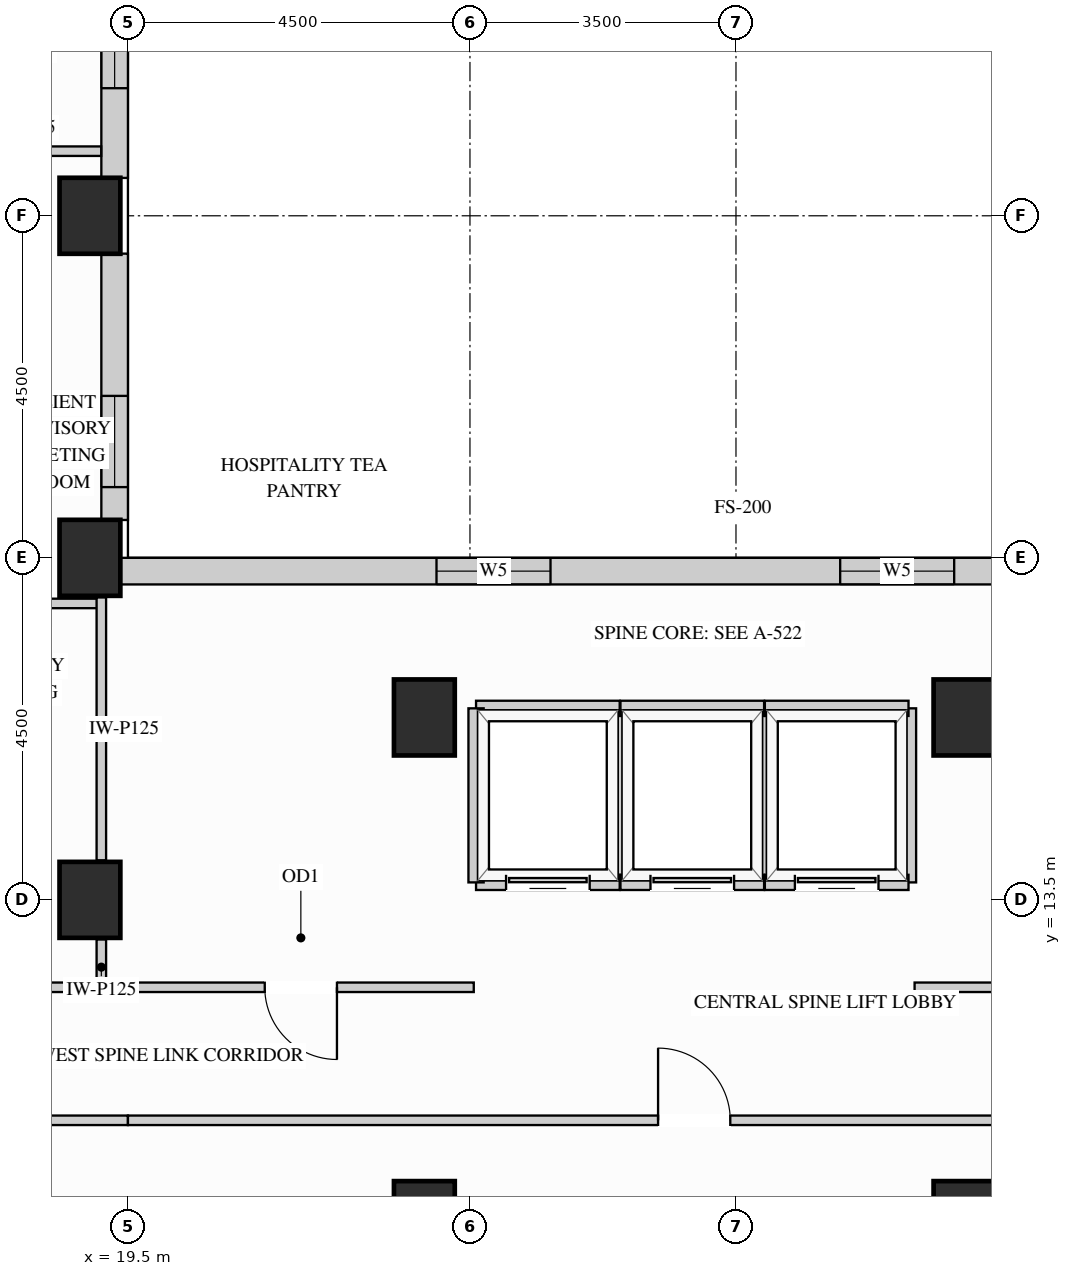
"""IFC4 building model, lengths in metres.
Left out: names, types, materials, properties, quantities, classifications, styles, units other than length and angle.
Written with IfcOpenShell. Run it as: python <this file> out.ifc"""

import sys

from ifc_helpers import new_model, si_unit, direction, frame, frame_2d, origin, origin_2d, place, context, subcontext, project, spatial, rectangle, extrude, source, transform, mapped, element, fill, save


model = new_model("IFC4")
c1 = context("Model", 3, precision=1e-05, world=origin(), true_north=direction((0.0, 1.0)))
c2 = subcontext(c1, "Body", "Model", "MODEL_VIEW")
j1 = project(units=[si_unit("LENGTHUNIT", "METRE"), si_unit("PLANEANGLEUNIT", "RADIAN")], contexts=[c1])
p1 = place(None, origin())
s1 = spatial("IfcSite", under=j1, at=p1, CompositionType="ELEMENT")
p2 = place(p1, origin())
s2 = spatial("IfcBuilding", under=s1, at=p2, CompositionType="ELEMENT")
p3 = place(p2, frame((0.0, 0.0, 164.7)))
s3 = spatial("IfcBuildingStorey", under=s2, at=p3, CompositionType="ELEMENT", Elevation=164.7)
m1 = source(origin(), c2, "Body", "SweptSolid", [
    extrude(rectangle(XDim=0.8, YDim=1.0, at=origin_2d()), origin(), (0.0, 0.0, 1.0), 3.4),
])
for number, where, z_axis, x_axis in (
    (1, (19.0, 13.5, 0.0), (0.0, 0.0, 1.0), (1.0, 0.0, 0.0)),
    (2, (19.0, 18.0, 0.0), (0.0, 0.0, 1.0), (1.0, 0.0, 0.0)),
    (3, (19.0, 22.5, 0.0), (0.0, 0.0, 1.0), (1.0, 0.0, 0.0)),
    (4, (23.4, 15.9, 0.0), (0.0, 0.0, 1.0), (1.0, 0.0, 0.0)),
    (5, (23.4, 9.3, 0.0), (0.0, 0.0, 1.0), (1.0, 0.0, 0.0)),
    (6, (30.5, 15.9, 0.0), (0.0, 0.0, 1.0), (1.0, 0.0, 0.0)),
    (7, (30.5, 9.3, 0.0), (0.0, 0.0, 1.0), (1.0, 0.0, 0.0)),
):
    element("IfcColumn", number, at=place(p3, frame(where, z_axis=z_axis, x_axis=x_axis)), inside=s3, PredefinedType="COLUMN", context=c2, shape_type="MappedRepresentation", body=[
        mapped(m1, transform((0.0, 0.0, 0.0), x_axis=(1.0, 0.0, 0.0), y_axis=(0.0, 1.0, 0.0), z_axis=(0.0, 0.0, 1.0))),
    ])
p4 = place(p3, frame((34.502, 17.825, 0.0), z_axis=(0.0, 0.0, 1.0), x_axis=(-1.0, 0.0, 0.0)))
e8 = element("IfcWall", 8, at=p4, inside=s3, PredefinedType="SOLIDWALL", context=c2, shape_type="SweptSolid", body=[
    extrude(rectangle(XDim=15.104, YDim=0.35, at=frame_2d((7.552, 0.0))), origin(), (0.0, 0.0, 1.0), 3.385),
])
p5 = place(p4, frame((4.131, 0.0, 0.78)))
e9 = element("IfcOpeningElement", 9, at=p5, cuts=e8, PredefinedType="OPENING", context=c2, shape_type="SweptSolid", body=[
    extrude(rectangle(XDim=1.5, YDim=2.0, at=frame_2d((0.75, 1.0))), frame((0.0, 0.185, 0.0), z_axis=(0.0, -1.0, 0.0), x_axis=(1.0, 0.0, 0.0)), (0.0, 0.0, 1.0), 0.37),
])
p6 = place(p4, frame((9.442, 0.0, 0.78)))
e10 = element("IfcOpeningElement", 10, at=p6, cuts=e8, PredefinedType="OPENING", context=c2, shape_type="SweptSolid", body=[
    extrude(rectangle(XDim=1.5, YDim=2.0, at=frame_2d((0.75, 1.0))), frame((0.0, 0.185, 0.0), z_axis=(0.0, -1.0, 0.0), x_axis=(1.0, 0.0, 0.0)), (0.0, 0.0, 1.0), 0.37),
])
p7 = place(p3, frame((19.325, 18.498, 0.0), z_axis=(0.0, 0.0, 1.0), x_axis=(0.0, 1.0, 0.0)))
e11 = element("IfcWall", 11, at=p7, inside=s3, PredefinedType="SOLIDWALL", context=c2, shape_type="SweptSolid", body=[
    extrude(rectangle(XDim=3.504, YDim=0.35, at=frame_2d((1.752, 0.0))), origin(), (0.0, 0.0, 1.0), 2.612),
])
p8 = place(p7, frame((0.433, 0.0, 0.78)))
e12 = element("IfcOpeningElement", 12, at=p8, cuts=e11, PredefinedType="OPENING", context=c2, shape_type="SweptSolid", body=[
    extrude(rectangle(XDim=1.2, YDim=1.652, at=frame_2d((0.6, 0.826))), frame((0.0, 0.185, 0.0), z_axis=(0.0, -1.0, 0.0), x_axis=(1.0, 0.0, 0.0)), (0.0, 0.0, 1.0), 0.37),
])
p9 = place(p3, frame((19.325, 22.998, 0.0), z_axis=(0.0, 0.0, 1.0), x_axis=(0.0, 1.0, 0.0)))
e13 = element("IfcWall", 13, at=p9, inside=s3, PredefinedType="SOLIDWALL", context=c2, shape_type="SweptSolid", body=[
    extrude(rectangle(XDim=3.304, YDim=0.35, at=frame_2d((1.652, 0.0))), origin(), (0.0, 0.0, 1.0), 2.612),
])
p10 = place(p9, frame((1.18, 0.0, 0.78)))
e14 = element("IfcOpeningElement", 14, at=p10, cuts=e13, PredefinedType="OPENING", context=c2, shape_type="SweptSolid", body=[
    extrude(rectangle(XDim=1.5, YDim=1.652, at=frame_2d((0.75, 0.826))), frame((0.0, 0.185, 0.0), z_axis=(0.0, -1.0, 0.0), x_axis=(1.0, 0.0, 0.0)), (0.0, 0.0, 1.0), 0.37),
])
m2 = source(origin(), c2, "Body", "SweptSolid", [
    extrude(rectangle(XDim=2.1, YDim=0.125, at=frame_2d((1.05, 0.0))), origin(), (0.0, 0.0, 1.0), 3.385),
])
p11 = place(p3, frame((17.05, 17.4, 0.0), z_axis=(0.0, 0.0, 1.0), x_axis=(1.0, 0.0, 0.0)))
e15 = element("IfcWall", 15, at=p11, inside=s3, PredefinedType="PARTITIONING", context=c2, shape_type="MappedRepresentation", body=[
    mapped(m2, transform((0.0, 0.0, 0.0), x_axis=(1.0, 0.0, 0.0), y_axis=(0.0, 1.0, 0.0), z_axis=(0.0, 0.0, 1.0))),
])
m3 = source(origin(), c2, "Body", "SweptSolid", [
    extrude(rectangle(XDim=2.098, YDim=0.125, at=frame_2d((1.049, 0.0))), origin(), (0.0, 0.0, 1.0), 3.385),
])
p12 = place(p3, frame((17.05, 23.35, 0.0), z_axis=(0.0, 0.0, 1.0), x_axis=(1.0, 0.0, 0.0)))
e16 = element("IfcWall", 16, at=p12, inside=s3, PredefinedType="PARTITIONING", context=c2, shape_type="MappedRepresentation", body=[
    mapped(m3, transform((0.0, 0.0, 0.0), x_axis=(1.0, 0.0, 0.0), y_axis=(0.0, 1.0, 0.0), z_axis=(0.0, 0.0, 1.0))),
])
m4 = source(origin(), c2, "Body", "SweptSolid", [
    extrude(rectangle(XDim=0.63, YDim=0.125, at=frame_2d((0.315, 0.0))), origin(), (0.0, 0.0, 1.0), 2.773),
])
p13 = place(p3, frame((19.15, 12.35, 0.0), z_axis=(0.0, 0.0, 1.0), x_axis=(0.0, 1.0, 0.0)))
e17 = element("IfcWall", 17, at=p13, inside=s3, PredefinedType="PARTITIONING", context=c2, shape_type="MappedRepresentation", body=[
    mapped(m4, transform((0.0, 0.0, 0.0), x_axis=(1.0, 0.0, 0.0), y_axis=(0.0, 1.0, 0.0), z_axis=(0.0, 0.0, 1.0))),
])
m5 = source(origin(), c2, "Body", "SweptSolid", [
    extrude(rectangle(XDim=3.46, YDim=0.125, at=frame_2d((1.73, 0.0))), origin(), (0.0, 0.0, 1.0), 2.773),
])
p14 = place(p3, frame((19.15, 14.02, 0.0), z_axis=(0.0, 0.0, 1.0), x_axis=(0.0, 1.0, 0.0)))
e18 = element("IfcWall", 18, at=p14, inside=s3, PredefinedType="PARTITIONING", context=c2, shape_type="MappedRepresentation", body=[
    mapped(m5, transform((0.0, 0.0, 0.0), x_axis=(1.0, 0.0, 0.0), y_axis=(0.0, 1.0, 0.0), z_axis=(0.0, 0.0, 1.0))),
])
p15 = place(p3, frame((29.85, 12.35, 0.0), z_axis=(0.0, 0.0, 1.0), x_axis=(1.0, 0.0, 0.0)))
e19 = element("IfcWall", 19, at=p15, inside=s3, PredefinedType="PARTITIONING", context=c2, shape_type="SweptSolid", body=[
    extrude(rectangle(XDim=4.55, YDim=0.125, at=frame_2d((2.275, 0.0))), origin(), (0.0, 0.0, 1.0), 3.385),
])
p16 = place(p15, frame((1.8, 0.0, 0.0)))
e20 = element("IfcOpeningElement", 20, at=p16, cuts=e19, PredefinedType="OPENING", context=c2, shape_type="SweptSolid", body=[
    extrude(rectangle(XDim=0.95, YDim=2.15, at=frame_2d((0.475, 1.075))), frame((0.0, 0.073, 0.0), z_axis=(0.0, -1.0, 0.0), x_axis=(1.0, 0.0, 0.0)), (0.0, 0.0, 1.0), 0.145),
])
m6 = source(origin(), c2, "Body", "SweptSolid", [
    extrude(rectangle(XDim=2.45, YDim=0.125, at=frame_2d((1.225, 0.0))), origin(), (0.0, 0.0, 1.0), 3.385),
])
p17 = place(p3, frame((17.05, 12.35, 0.0), z_axis=(0.0, 0.0, 1.0), x_axis=(1.0, 0.0, 0.0)))
e21 = element("IfcWall", 21, at=p17, inside=s3, PredefinedType="PARTITIONING", context=c2, shape_type="MappedRepresentation", body=[
    mapped(m6, transform((0.0, 0.0, 0.0), x_axis=(1.0, 0.0, 0.0), y_axis=(0.0, 1.0, 0.0), z_axis=(0.0, 0.0, 1.0))),
])
p18 = place(p3, frame((19.5, 12.35, 0.0), z_axis=(0.0, 0.0, 1.0), x_axis=(1.0, 0.0, 0.0)))
e22 = element("IfcWall", 22, at=p18, inside=s3, PredefinedType="PARTITIONING", context=c2, shape_type="SweptSolid", body=[
    extrude(rectangle(XDim=4.55, YDim=0.125, at=frame_2d((2.275, 0.0))), origin(), (0.0, 0.0, 1.0), 3.385),
])
p19 = place(p18, frame((1.8, 0.0, 0.0)))
e23 = element("IfcOpeningElement", 23, at=p19, cuts=e22, PredefinedType="OPENING", context=c2, shape_type="SweptSolid", body=[
    extrude(rectangle(XDim=0.95, YDim=2.15, at=frame_2d((0.475, 1.075))), frame((0.0, 0.073, 0.0), z_axis=(0.0, -1.0, 0.0), x_axis=(1.0, 0.0, 0.0)), (0.0, 0.0, 1.0), 0.145),
])
p20 = place(p3, frame((17.05, 10.6, 0.0), z_axis=(0.0, 0.0, 1.0), x_axis=(1.0, 0.0, 0.0)))
e24 = element("IfcWall", 24, at=p20, inside=s3, PredefinedType="PARTITIONING", context=c2, shape_type="MappedRepresentation", body=[
    mapped(m6, transform((0.0, 0.0, 0.0), x_axis=(1.0, 0.0, 0.0), y_axis=(0.0, 1.0, 0.0), z_axis=(0.0, 0.0, 1.0))),
])
p21 = place(p3, frame((19.5, 10.6, 0.0), z_axis=(0.0, 0.0, 1.0), x_axis=(1.0, 0.0, 0.0)))
e25 = element("IfcWall", 25, at=p21, inside=s3, PredefinedType="PARTITIONING", context=c2, shape_type="SweptSolid", body=[
    extrude(rectangle(XDim=14.9, YDim=0.125, at=frame_2d((7.45, 0.0))), origin(), (0.0, 0.0, 1.0), 3.385),
])
p22 = place(p21, frame((6.975, 0.0, 0.0)))
e26 = element("IfcOpeningElement", 26, at=p22, cuts=e25, PredefinedType="OPENING", context=c2, shape_type="SweptSolid", body=[
    extrude(rectangle(XDim=0.95, YDim=2.15, at=frame_2d((0.475, 1.075))), frame((0.0, 0.073, 0.0), z_axis=(0.0, -1.0, 0.0), x_axis=(1.0, 0.0, 0.0)), (0.0, 0.0, 1.0), 0.145),
])
m7 = source(origin(), c2, "Body", "SweptSolid", [
    extrude(rectangle(XDim=2.29, YDim=0.2, at=frame_2d((1.145, 0.0))), origin(), (0.0, 0.0, 1.0), 3.385),
])
p23 = place(p3, frame((25.97, 13.73, 0.0), z_axis=(0.0, 0.0, 1.0), x_axis=(0.0, 1.0, 0.0)))
e27 = element("IfcWall", 27, at=p23, inside=s3, PredefinedType="PARTITIONING", context=c2, shape_type="MappedRepresentation", body=[
    mapped(m7, transform((0.0, 0.0, 0.0), x_axis=(1.0, 0.0, 0.0), y_axis=(0.0, 1.0, 0.0), z_axis=(0.0, 0.0, 1.0))),
])
m8 = source(origin(), c2, "Body", "SweptSolid", [
    extrude(rectangle(XDim=1.89, YDim=0.2, at=frame_2d((0.945, 0.0))), origin(), (0.0, 0.0, 1.0), 2.773),
])
p24 = place(p3, frame((24.08, 16.02, 0.0), z_axis=(0.0, 0.0, 1.0), x_axis=(1.0, 0.0, 0.0)))
e28 = element("IfcWall", 28, at=p24, inside=s3, PredefinedType="PARTITIONING", context=c2, shape_type="MappedRepresentation", body=[
    mapped(m8, transform((0.0, 0.0, 0.0), x_axis=(1.0, 0.0, 0.0), y_axis=(0.0, 1.0, 0.0), z_axis=(0.0, 0.0, 1.0))),
])
p25 = place(p3, frame((24.08, 13.73, 0.0), z_axis=(0.0, 0.0, 1.0), x_axis=(1.0, 0.0, 0.0)))
e29 = element("IfcWall", 29, at=p25, inside=s3, PredefinedType="PARTITIONING", context=c2, shape_type="SweptSolid", body=[
    extrude(rectangle(XDim=1.89, YDim=0.2, at=frame_2d((0.945, 0.0))), origin(), (0.0, 0.0, 1.0), 2.466),
])
p26 = place(p25, frame((0.395, 0.0, 0.0)))
e30 = element("IfcOpeningElement", 30, at=p26, cuts=e29, PredefinedType="OPENING", context=c2, shape_type="SweptSolid", body=[
    extrude(rectangle(XDim=1.1, YDim=2.2, at=frame_2d((0.55, 1.1))), frame((0.0, 0.11, 0.0), z_axis=(0.0, -1.0, 0.0), x_axis=(1.0, 0.0, 0.0)), (0.0, 0.0, 1.0), 0.22),
])
for number, where, z_axis, x_axis in (
    (31, (24.08, 13.73, 0.0), (0.0, 0.0, 1.0), (0.0, 1.0, 0.0)),
    (32, (27.87, 13.73, 0.0), (0.0, 0.0, 1.0), (0.0, 1.0, 0.0)),
):
    element("IfcWall", number, at=place(p3, frame(where, z_axis=z_axis, x_axis=x_axis)), inside=s3, PredefinedType="PARTITIONING", context=c2, shape_type="MappedRepresentation", body=[
        mapped(m7, transform((0.0, 0.0, 0.0), x_axis=(1.0, 0.0, 0.0), y_axis=(0.0, 1.0, 0.0), z_axis=(0.0, 0.0, 1.0))),
    ])
m9 = source(origin(), c2, "Body", "SweptSolid", [
    extrude(rectangle(XDim=1.89, YDim=0.2, at=frame_2d((0.945, 0.0))), origin(), (0.0, 0.0, 1.0), 2.773),
])
p27 = place(p3, frame((25.98, 16.02, 0.0), z_axis=(0.0, 0.0, 1.0), x_axis=(1.0, 0.0, 0.0)))
e33 = element("IfcWall", 33, at=p27, inside=s3, PredefinedType="PARTITIONING", context=c2, shape_type="MappedRepresentation", body=[
    mapped(m9, transform((0.0, 0.0, 0.0), x_axis=(1.0, 0.0, 0.0), y_axis=(0.0, 1.0, 0.0), z_axis=(0.0, 0.0, 1.0))),
])
p28 = place(p3, frame((25.98, 13.73, 0.0), z_axis=(0.0, 0.0, 1.0), x_axis=(1.0, 0.0, 0.0)))
e34 = element("IfcWall", 34, at=p28, inside=s3, PredefinedType="PARTITIONING", context=c2, shape_type="SweptSolid", body=[
    extrude(rectangle(XDim=1.89, YDim=0.2, at=frame_2d((0.945, 0.0))), origin(), (0.0, 0.0, 1.0), 2.466),
])
p29 = place(p28, frame((0.395, 0.0, 0.0)))
e35 = element("IfcOpeningElement", 35, at=p29, cuts=e34, PredefinedType="OPENING", context=c2, shape_type="SweptSolid", body=[
    extrude(rectangle(XDim=1.1, YDim=2.2, at=frame_2d((0.55, 1.1))), frame((0.0, 0.11, 0.0), z_axis=(0.0, -1.0, 0.0), x_axis=(1.0, 0.0, 0.0)), (0.0, 0.0, 1.0), 0.22),
])
p30 = place(p3, frame((29.77, 13.73, 0.0), z_axis=(0.0, 0.0, 1.0), x_axis=(0.0, 1.0, 0.0)))
e36 = element("IfcWall", 36, at=p30, inside=s3, PredefinedType="PARTITIONING", context=c2, shape_type="MappedRepresentation", body=[
    mapped(m7, transform((0.0, 0.0, 0.0), x_axis=(1.0, 0.0, 0.0), y_axis=(0.0, 1.0, 0.0), z_axis=(0.0, 0.0, 1.0))),
])
p31 = place(p3, frame((27.88, 16.02, 0.0), z_axis=(0.0, 0.0, 1.0), x_axis=(1.0, 0.0, 0.0)))
e37 = element("IfcWall", 37, at=p31, inside=s3, PredefinedType="PARTITIONING", context=c2, shape_type="MappedRepresentation", body=[
    mapped(m9, transform((0.0, 0.0, 0.0), x_axis=(1.0, 0.0, 0.0), y_axis=(0.0, 1.0, 0.0), z_axis=(0.0, 0.0, 1.0))),
])
p32 = place(p3, frame((27.88, 13.73, 0.0), z_axis=(0.0, 0.0, 1.0), x_axis=(1.0, 0.0, 0.0)))
e38 = element("IfcWall", 38, at=p32, inside=s3, PredefinedType="PARTITIONING", context=c2, shape_type="SweptSolid", body=[
    extrude(rectangle(XDim=1.89, YDim=0.2, at=frame_2d((0.945, 0.0))), origin(), (0.0, 0.0, 1.0), 2.466),
])
p33 = place(p32, frame((0.395, 0.0, 0.0)))
e39 = element("IfcOpeningElement", 39, at=p33, cuts=e38, PredefinedType="OPENING", context=c2, shape_type="SweptSolid", body=[
    extrude(rectangle(XDim=1.1, YDim=2.2, at=frame_2d((0.55, 1.1))), frame((0.0, 0.11, 0.0), z_axis=(0.0, -1.0, 0.0), x_axis=(1.0, 0.0, 0.0)), (0.0, 0.0, 1.0), 0.22),
])
m10 = source(origin(), c2, "Body", "SweptSolid", [
    extrude(rectangle(XDim=1.1, YDim=2.2, at=frame_2d((0.55, 1.1))), frame((0.0, 0.025, 0.0), z_axis=(0.0, -1.0, 0.0), x_axis=(1.0, 0.0, 0.0)), (0.0, 0.0, 1.0), 0.05),
])
p34 = place(p26, origin())
e40 = element("IfcDoor", 40, at=p34, inside=s3, OperationType="SLIDING_TO_LEFT", PredefinedType="DOOR", context=c2, shape_type="MappedRepresentation", body=[
    mapped(m10, transform((0.0, 0.0, 0.0), x_axis=(1.0, 0.0, 0.0), y_axis=(0.0, 1.0, 0.0), z_axis=(0.0, 0.0, 1.0))),
])
fill(e30, e40)
p35 = place(p29, origin())
e41 = element("IfcDoor", 41, at=p35, inside=s3, OperationType="SLIDING_TO_LEFT", PredefinedType="DOOR", context=c2, shape_type="MappedRepresentation", body=[
    mapped(m10, transform((0.0, 0.0, 0.0), x_axis=(1.0, 0.0, 0.0), y_axis=(0.0, 1.0, 0.0), z_axis=(0.0, 0.0, 1.0))),
])
fill(e35, e41)
p36 = place(p33, origin())
e42 = element("IfcDoor", 42, at=p36, inside=s3, OperationType="SLIDING_TO_LEFT", PredefinedType="DOOR", context=c2, shape_type="MappedRepresentation", body=[
    mapped(m10, transform((0.0, 0.0, 0.0), x_axis=(1.0, 0.0, 0.0), y_axis=(0.0, 1.0, 0.0), z_axis=(0.0, 0.0, 1.0))),
])
fill(e39, e42)
m11 = source(origin(), c2, "Body", "SweptSolid", [
    extrude(rectangle(XDim=0.95, YDim=2.15, at=frame_2d((0.475, 1.075))), frame((0.0, 0.025, 0.0), z_axis=(0.0, -1.0, 0.0), x_axis=(1.0, 0.0, 0.0)), (0.0, 0.0, 1.0), 0.05),
])
p37 = place(p19, origin())
e43 = element("IfcDoor", 43, at=p37, inside=s3, OperationType="SINGLE_SWING_RIGHT", PredefinedType="DOOR", context=c2, shape_type="MappedRepresentation", body=[
    mapped(m11, transform((0.0, 0.0, 0.0), x_axis=(1.0, 0.0, 0.0), y_axis=(0.0, 1.0, 0.0), z_axis=(0.0, 0.0, 1.0))),
])
fill(e23, e43)
p38 = place(p22, origin())
e44 = element("IfcDoor", 44, at=p38, inside=s3, OperationType="SINGLE_SWING_LEFT", PredefinedType="DOOR", context=c2, shape_type="MappedRepresentation", body=[
    mapped(m11, transform((0.0, 0.0, 0.0), x_axis=(1.0, 0.0, 0.0), y_axis=(0.0, 1.0, 0.0), z_axis=(0.0, 0.0, 1.0))),
])
fill(e26, e44)
m12 = source(origin(), c2, "Body", "SweptSolid", [
    extrude(rectangle(XDim=1.2, YDim=1.652, at=frame_2d((0.6, 0.826))), frame((0.0, 0.03, 0.0), z_axis=(0.0, -1.0, 0.0), x_axis=(1.0, 0.0, 0.0)), (0.0, 0.0, 1.0), 0.06),
])
p39 = place(p8, origin())
e45 = element("IfcWindow", 45, at=p39, inside=s3, PartitioningType="SINGLE_PANEL", PredefinedType="WINDOW", context=c2, shape_type="MappedRepresentation", body=[
    mapped(m12, transform((0.0, 0.0, 0.0), x_axis=(1.0, 0.0, 0.0), y_axis=(0.0, 1.0, 0.0), z_axis=(0.0, 0.0, 1.0))),
])
fill(e12, e45)
m13 = source(origin(), c2, "Body", "SweptSolid", [
    extrude(rectangle(XDim=1.5, YDim=2.0, at=frame_2d((0.75, 1.0))), frame((0.0, 0.03, 0.0), z_axis=(0.0, -1.0, 0.0), x_axis=(1.0, 0.0, 0.0)), (0.0, 0.0, 1.0), 0.06),
])
p40 = place(p5, origin())
e46 = element("IfcWindow", 46, at=p40, inside=s3, PartitioningType="SINGLE_PANEL", PredefinedType="WINDOW", context=c2, shape_type="MappedRepresentation", body=[
    mapped(m13, transform((0.0, 0.0, 0.0), x_axis=(1.0, 0.0, 0.0), y_axis=(0.0, 1.0, 0.0), z_axis=(0.0, 0.0, 1.0))),
])
fill(e9, e46)
p41 = place(p6, origin())
e47 = element("IfcWindow", 47, at=p41, inside=s3, PartitioningType="SINGLE_PANEL", PredefinedType="WINDOW", context=c2, shape_type="MappedRepresentation", body=[
    mapped(m13, transform((0.0, 0.0, 0.0), x_axis=(1.0, 0.0, 0.0), y_axis=(0.0, 1.0, 0.0), z_axis=(0.0, 0.0, 1.0))),
])
fill(e10, e47)
m14 = source(origin(), c2, "Body", "SweptSolid", [
    extrude(rectangle(XDim=1.5, YDim=1.652, at=frame_2d((0.75, 0.826))), frame((0.0, 0.03, 0.0), z_axis=(0.0, -1.0, 0.0), x_axis=(1.0, 0.0, 0.0)), (0.0, 0.0, 1.0), 0.06),
])
p42 = place(p10, origin())
e48 = element("IfcWindow", 48, at=p42, inside=s3, PartitioningType="SINGLE_PANEL", PredefinedType="WINDOW", context=c2, shape_type="MappedRepresentation", body=[
    mapped(m14, transform((0.0, 0.0, 0.0), x_axis=(1.0, 0.0, 0.0), y_axis=(0.0, 1.0, 0.0), z_axis=(0.0, 0.0, 1.0))),
])
fill(e14, e48)
save(model, sys.argv[1])
